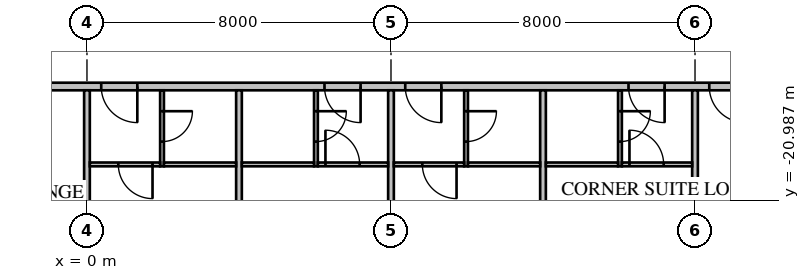
"""IFC4 building model, lengths in metres.
Left out: names, types, materials, properties, quantities, classifications, styles, units other than length and angle.
Written with IfcOpenShell. Run it as: python <this file> out.ifc"""

import sys

from ifc_helpers import new_model, si_unit, direction, frame, frame_2d, origin, place, context, subcontext, project, spatial, rectangle, extrude, element, fill, save


model = new_model("IFC4")
c1 = context("Model", 3, precision=1e-05, world=origin(), true_north=direction((0.0, 1.0)))
c2 = subcontext(c1, "Body", "Model", "MODEL_VIEW")
j1 = project(units=[si_unit("LENGTHUNIT", "METRE"), si_unit("PLANEANGLEUNIT", "RADIAN")], contexts=[c1])
p1 = place(None, origin())
s1 = spatial("IfcSite", under=j1, at=p1, CompositionType="ELEMENT")
p2 = place(p1, origin())
s2 = spatial("IfcBuilding", under=s1, at=p2, CompositionType="ELEMENT")
p3 = place(p2, frame((0.0, 0.0, 35.25)))
s3 = spatial("IfcBuildingStorey", under=s2, at=p3, CompositionType="ELEMENT", Elevation=35.25)
p4 = place(p3, frame((-18.0, -18.0, 0.0), z_axis=(0.0, 0.0, 1.0), x_axis=(1.0, 0.0, 0.0)))
e1 = element("IfcWall", 1, at=p4, inside=s3, PredefinedType="PARTITIONING", context=c2, shape_type="SweptSolid", body=[
    extrude(rectangle(XDim=36.0, YDim=0.2, at=frame_2d((18.0, 0.0))), origin(), (0.0, 0.0, 1.0), 3.65),
])
p5 = place(p4, frame((0.375, 0.0, 0.0)))
e2 = element("IfcOpeningElement", 2, at=p5, cuts=e1, PredefinedType="OPENING", context=c2, shape_type="SweptSolid", body=[
    extrude(rectangle(XDim=1.0, YDim=2.1, at=frame_2d((0.5, 1.05))), frame((0.0, 0.12, 0.0), z_axis=(0.0, -1.0, 0.0), x_axis=(1.0, 0.0, 0.0)), (0.0, 0.0, 1.0), 0.24),
])
p6 = place(p4, frame((2.45, 0.0, 0.0)))
e3 = element("IfcOpeningElement", 3, at=p6, cuts=e1, PredefinedType="OPENING", context=c2, shape_type="SweptSolid", body=[
    extrude(rectangle(XDim=0.8, YDim=2.1, at=frame_2d((0.4, 1.05))), frame((0.0, 0.12, 0.0), z_axis=(0.0, -1.0, 0.0), x_axis=(1.0, 0.0, 0.0)), (0.0, 0.0, 1.0), 0.24),
])
p7 = place(p4, frame((4.05, 0.0, 0.0)))
e4 = element("IfcOpeningElement", 4, at=p7, cuts=e1, PredefinedType="OPENING", context=c2, shape_type="SweptSolid", body=[
    extrude(rectangle(XDim=1.0, YDim=2.1, at=frame_2d((0.5, 1.05))), frame((0.0, 0.12, 0.0), z_axis=(0.0, -1.0, 0.0), x_axis=(1.0, 0.0, 0.0)), (0.0, 0.0, 1.0), 0.24),
])
p8 = place(p4, frame((6.45, 0.0, 0.0)))
e5 = element("IfcOpeningElement", 5, at=p8, cuts=e1, PredefinedType="OPENING", context=c2, shape_type="SweptSolid", body=[
    extrude(rectangle(XDim=0.9, YDim=2.1, at=frame_2d((0.45, 1.05))), frame((0.0, 0.12, 0.0), z_axis=(0.0, -1.0, 0.0), x_axis=(1.0, 0.0, 0.0)), (0.0, 0.0, 1.0), 0.24),
])
p9 = place(p4, frame((8.15, 0.0, 0.0)))
e6 = element("IfcOpeningElement", 6, at=p9, cuts=e1, PredefinedType="OPENING", context=c2, shape_type="SweptSolid", body=[
    extrude(rectangle(XDim=1.0, YDim=2.1, at=frame_2d((0.5, 1.05))), frame((0.0, 0.12, 0.0), z_axis=(0.0, -1.0, 0.0), x_axis=(1.0, 0.0, 0.0)), (0.0, 0.0, 1.0), 0.24),
])
p10 = place(p4, frame((18.375, 0.0, 0.0)))
e7 = element("IfcOpeningElement", 7, at=p10, cuts=e1, PredefinedType="OPENING", context=c2, shape_type="SweptSolid", body=[
    extrude(rectangle(XDim=0.95, YDim=2.1, at=frame_2d((0.475, 1.05))), frame((0.0, 0.12, 0.0), z_axis=(0.0, -1.0, 0.0), x_axis=(1.0, 0.0, 0.0)), (0.0, 0.0, 1.0), 0.24),
])
p11 = place(p4, frame((24.25, 0.0, 0.0)))
e8 = element("IfcOpeningElement", 8, at=p11, cuts=e1, PredefinedType="OPENING", context=c2, shape_type="SweptSolid", body=[
    extrude(rectangle(XDim=0.95, YDim=2.1, at=frame_2d((0.475, 1.05))), frame((0.0, 0.12, 0.0), z_axis=(0.0, -1.0, 0.0), x_axis=(1.0, 0.0, 0.0)), (0.0, 0.0, 1.0), 0.24),
])
p12 = place(p4, frame((26.375, 0.0, 0.0)))
e9 = element("IfcOpeningElement", 9, at=p12, cuts=e1, PredefinedType="OPENING", context=c2, shape_type="SweptSolid", body=[
    extrude(rectangle(XDim=0.95, YDim=2.1, at=frame_2d((0.475, 1.05))), frame((0.0, 0.12, 0.0), z_axis=(0.0, -1.0, 0.0), x_axis=(1.0, 0.0, 0.0)), (0.0, 0.0, 1.0), 0.24),
])
p13 = place(p4, frame((32.25, 0.0, 0.0)))
e10 = element("IfcOpeningElement", 10, at=p13, cuts=e1, PredefinedType="OPENING", context=c2, shape_type="SweptSolid", body=[
    extrude(rectangle(XDim=0.95, YDim=2.1, at=frame_2d((0.475, 1.05))), frame((0.0, 0.12, 0.0), z_axis=(0.0, -1.0, 0.0), x_axis=(1.0, 0.0, 0.0)), (0.0, 0.0, 1.0), 0.24),
])
p14 = place(p4, frame((34.375, 0.0, 0.0)))
e11 = element("IfcOpeningElement", 11, at=p14, cuts=e1, PredefinedType="OPENING", context=c2, shape_type="SweptSolid", body=[
    extrude(rectangle(XDim=0.95, YDim=2.1, at=frame_2d((0.475, 1.05))), frame((0.0, 0.12, 0.0), z_axis=(0.0, -1.0, 0.0), x_axis=(1.0, 0.0, 0.0)), (0.0, 0.0, 1.0), 0.24),
])
p15 = place(p4, frame((11.2, 0.0, 0.0)))
e12 = element("IfcOpeningElement", 12, at=p15, cuts=e1, PredefinedType="OPENING", context=c2, shape_type="SweptSolid", body=[
    extrude(rectangle(XDim=1.0, YDim=2.1, at=frame_2d((0.5, 1.05))), frame((0.0, 0.12, 0.0), z_axis=(0.0, -1.0, 0.0), x_axis=(1.0, 0.0, 0.0)), (0.0, 0.0, 1.0), 0.24),
])
p16 = place(p3, frame((0.0, -18.1, 0.0), z_axis=(0.0, 0.0, 1.0), x_axis=(0.0, -1.0, 0.0)))
e13 = element("IfcWall", 13, at=p16, inside=s3, PredefinedType="PARTITIONING", context=c2, shape_type="SweptSolid", body=[
    extrude(rectangle(XDim=6.6, YDim=0.15, at=frame_2d((3.3, 0.0))), origin(), (0.0, 0.0, 1.0), 2.809),
])
for number, where, z_axis, x_axis in (
    (14, (4.0, -18.1, 0.0), (0.0, 0.0, 1.0), (0.0, -1.0, 0.0)),
    (15, (8.0, -18.1, 0.0), (0.0, 0.0, 1.0), (0.0, -1.0, 0.0)),
    (16, (12.0, -18.1, 0.0), (0.0, 0.0, 1.0), (0.0, -1.0, 0.0)),
):
    element("IfcWall", number, at=place(p3, frame(where, z_axis=z_axis, x_axis=x_axis)), inside=s3, PredefinedType="PARTITIONING", context=c2, shape_type="SweptSolid", body=[
        extrude(rectangle(XDim=6.6, YDim=0.15, at=frame_2d((3.3, 0.0))), origin(), (0.0, 0.0, 1.0), 3.65),
    ])
p17 = place(p3, frame((16.0, -18.1, 0.0), z_axis=(0.0, 0.0, 1.0), x_axis=(0.0, -1.0, 0.0)))
e17 = element("IfcWall", 17, at=p17, inside=s3, PredefinedType="PARTITIONING", context=c2, shape_type="SweptSolid", body=[
    extrude(rectangle(XDim=6.589, YDim=0.15, at=frame_2d((3.295, 0.0))), origin(), (0.0, 0.0, 1.0), 3.65),
])
p18 = place(p3, frame((1.975, -18.1, 0.0), z_axis=(0.0, 0.0, 1.0), x_axis=(0.0, -1.0, 0.0)))
e18 = element("IfcWall", 18, at=p18, inside=s3, PredefinedType="PARTITIONING", context=c2, shape_type="SweptSolid", body=[
    extrude(rectangle(XDim=2.0, YDim=0.1, at=frame_2d((1.0, 0.0))), origin(), (0.0, 0.0, 1.0), 3.65),
])
p19 = place(p18, frame((0.55, 0.0, 0.0)))
e19 = element("IfcOpeningElement", 19, at=p19, cuts=e18, PredefinedType="OPENING", context=c2, shape_type="SweptSolid", body=[
    extrude(rectangle(XDim=0.8, YDim=2.1, at=frame_2d((0.4, 1.05))), frame((0.0, 0.07, 0.0), z_axis=(0.0, -1.0, 0.0), x_axis=(1.0, 0.0, 0.0)), (0.0, 0.0, 1.0), 0.14),
])
p20 = place(p3, frame((2.025, -20.05, 0.0), z_axis=(0.0, 0.0, 1.0), x_axis=(1.0, 0.0, 0.0)))
e20 = element("IfcWall", 20, at=p20, inside=s3, PredefinedType="PARTITIONING", context=c2, shape_type="SweptSolid", body=[
    extrude(rectangle(XDim=1.9, YDim=0.1, at=frame_2d((0.95, 0.0))), origin(), (0.0, 0.0, 1.0), 3.65),
])
p21 = place(p3, frame((6.025, -18.1, 0.0), z_axis=(0.0, 0.0, 1.0), x_axis=(0.0, -1.0, 0.0)))
e21 = element("IfcWall", 21, at=p21, inside=s3, PredefinedType="PARTITIONING", context=c2, shape_type="SweptSolid", body=[
    extrude(rectangle(XDim=2.0, YDim=0.1, at=frame_2d((1.0, 0.0))), origin(), (0.0, 0.0, 1.0), 3.65),
])
p22 = place(p21, frame((0.55, 0.0, 0.0)))
e22 = element("IfcOpeningElement", 22, at=p22, cuts=e21, PredefinedType="OPENING", context=c2, shape_type="SweptSolid", body=[
    extrude(rectangle(XDim=0.8, YDim=2.1, at=frame_2d((0.4, 1.05))), frame((0.0, 0.07, 0.0), z_axis=(0.0, -1.0, 0.0), x_axis=(1.0, 0.0, 0.0)), (0.0, 0.0, 1.0), 0.14),
])
p23 = place(p3, frame((4.075, -20.05, 0.0), z_axis=(0.0, 0.0, 1.0), x_axis=(1.0, 0.0, 0.0)))
e23 = element("IfcWall", 23, at=p23, inside=s3, PredefinedType="PARTITIONING", context=c2, shape_type="SweptSolid", body=[
    extrude(rectangle(XDim=1.9, YDim=0.1, at=frame_2d((0.95, 0.0))), origin(), (0.0, 0.0, 1.0), 3.65),
])
p24 = place(p3, frame((9.975, -18.1, 0.0), z_axis=(0.0, 0.0, 1.0), x_axis=(0.0, -1.0, 0.0)))
e24 = element("IfcWall", 24, at=p24, inside=s3, PredefinedType="PARTITIONING", context=c2, shape_type="SweptSolid", body=[
    extrude(rectangle(XDim=2.0, YDim=0.1, at=frame_2d((1.0, 0.0))), origin(), (0.0, 0.0, 1.0), 3.65),
])
p25 = place(p24, frame((0.55, 0.0, 0.0)))
e25 = element("IfcOpeningElement", 25, at=p25, cuts=e24, PredefinedType="OPENING", context=c2, shape_type="SweptSolid", body=[
    extrude(rectangle(XDim=0.8, YDim=2.1, at=frame_2d((0.4, 1.05))), frame((0.0, 0.07, 0.0), z_axis=(0.0, -1.0, 0.0), x_axis=(1.0, 0.0, 0.0)), (0.0, 0.0, 1.0), 0.14),
])
p26 = place(p3, frame((10.025, -20.05, 0.0), z_axis=(0.0, 0.0, 1.0), x_axis=(1.0, 0.0, 0.0)))
e26 = element("IfcWall", 26, at=p26, inside=s3, PredefinedType="PARTITIONING", context=c2, shape_type="SweptSolid", body=[
    extrude(rectangle(XDim=1.9, YDim=0.1, at=frame_2d((0.95, 0.0))), origin(), (0.0, 0.0, 1.0), 3.65),
])
p27 = place(p3, frame((14.025, -18.1, 0.0), z_axis=(0.0, 0.0, 1.0), x_axis=(0.0, -1.0, 0.0)))
e27 = element("IfcWall", 27, at=p27, inside=s3, PredefinedType="PARTITIONING", context=c2, shape_type="SweptSolid", body=[
    extrude(rectangle(XDim=2.0, YDim=0.1, at=frame_2d((1.0, 0.0))), origin(), (0.0, 0.0, 1.0), 3.65),
])
p28 = place(p27, frame((0.55, 0.0, 0.0)))
e28 = element("IfcOpeningElement", 28, at=p28, cuts=e27, PredefinedType="OPENING", context=c2, shape_type="SweptSolid", body=[
    extrude(rectangle(XDim=0.8, YDim=2.1, at=frame_2d((0.4, 1.05))), frame((0.0, 0.07, 0.0), z_axis=(0.0, -1.0, 0.0), x_axis=(1.0, 0.0, 0.0)), (0.0, 0.0, 1.0), 0.14),
])
p29 = place(p3, frame((12.075, -20.05, 0.0), z_axis=(0.0, 0.0, 1.0), x_axis=(1.0, 0.0, 0.0)))
e29 = element("IfcWall", 29, at=p29, inside=s3, PredefinedType="PARTITIONING", context=c2, shape_type="SweptSolid", body=[
    extrude(rectangle(XDim=1.9, YDim=0.1, at=frame_2d((0.95, 0.0))), origin(), (0.0, 0.0, 1.0), 3.65),
])
p30 = place(p3, frame((0.075, -20.05, 0.0), z_axis=(0.0, 0.0, 1.0), x_axis=(1.0, 0.0, 0.0)))
e30 = element("IfcWall", 30, at=p30, inside=s3, PredefinedType="PARTITIONING", context=c2, shape_type="SweptSolid", body=[
    extrude(rectangle(XDim=1.85, YDim=0.1, at=frame_2d((0.925, 0.0))), origin(), (0.0, 0.0, 1.0), 3.65),
])
p31 = place(p30, frame((0.75, 0.0, 0.0)))
e31 = element("IfcOpeningElement", 31, at=p31, cuts=e30, PredefinedType="OPENING", context=c2, shape_type="SweptSolid", body=[
    extrude(rectangle(XDim=0.9, YDim=2.1, at=frame_2d((0.45, 1.05))), frame((0.0, 0.07, 0.0), z_axis=(0.0, -1.0, 0.0), x_axis=(1.0, 0.0, 0.0)), (0.0, 0.0, 1.0), 0.14),
])
p32 = place(p3, frame((6.075, -20.05, 0.0), z_axis=(0.0, 0.0, 1.0), x_axis=(1.0, 0.0, 0.0)))
e32 = element("IfcWall", 32, at=p32, inside=s3, PredefinedType="PARTITIONING", context=c2, shape_type="SweptSolid", body=[
    extrude(rectangle(XDim=1.85, YDim=0.1, at=frame_2d((0.925, 0.0))), origin(), (0.0, 0.0, 1.0), 3.65),
])
p33 = place(p32, frame((0.2, 0.0, 0.0)))
e33 = element("IfcOpeningElement", 33, at=p33, cuts=e32, PredefinedType="OPENING", context=c2, shape_type="SweptSolid", body=[
    extrude(rectangle(XDim=0.9, YDim=2.1, at=frame_2d((0.45, 1.05))), frame((0.0, 0.07, 0.0), z_axis=(0.0, -1.0, 0.0), x_axis=(1.0, 0.0, 0.0)), (0.0, 0.0, 1.0), 0.14),
])
p34 = place(p3, frame((8.075, -20.05, 0.0), z_axis=(0.0, 0.0, 1.0), x_axis=(1.0, 0.0, 0.0)))
e34 = element("IfcWall", 34, at=p34, inside=s3, PredefinedType="PARTITIONING", context=c2, shape_type="SweptSolid", body=[
    extrude(rectangle(XDim=1.85, YDim=0.1, at=frame_2d((0.925, 0.0))), origin(), (0.0, 0.0, 1.0), 3.65),
])
p35 = place(p34, frame((0.75, 0.0, 0.0)))
e35 = element("IfcOpeningElement", 35, at=p35, cuts=e34, PredefinedType="OPENING", context=c2, shape_type="SweptSolid", body=[
    extrude(rectangle(XDim=0.9, YDim=2.1, at=frame_2d((0.45, 1.05))), frame((0.0, 0.07, 0.0), z_axis=(0.0, -1.0, 0.0), x_axis=(1.0, 0.0, 0.0)), (0.0, 0.0, 1.0), 0.14),
])
p36 = place(p3, frame((14.075, -20.05, 0.0), z_axis=(0.0, 0.0, 1.0), x_axis=(1.0, 0.0, 0.0)))
e36 = element("IfcWall", 36, at=p36, inside=s3, PredefinedType="PARTITIONING", context=c2, shape_type="SweptSolid", body=[
    extrude(rectangle(XDim=1.85, YDim=0.1, at=frame_2d((0.925, 0.0))), origin(), (0.0, 0.0, 1.0), 3.65),
])
p37 = place(p36, frame((0.2, 0.0, 0.0)))
e37 = element("IfcOpeningElement", 37, at=p37, cuts=e36, PredefinedType="OPENING", context=c2, shape_type="SweptSolid", body=[
    extrude(rectangle(XDim=0.9, YDim=2.1, at=frame_2d((0.45, 1.05))), frame((0.0, 0.07, 0.0), z_axis=(0.0, -1.0, 0.0), x_axis=(1.0, 0.0, 0.0)), (0.0, 0.0, 1.0), 0.14),
])
p38 = place(p10, origin())
e38 = element("IfcDoor", 38, at=p38, inside=s3, OperationType="SINGLE_SWING_RIGHT", PredefinedType="DOOR", context=c2, shape_type="SweptSolid", body=[
    extrude(rectangle(XDim=0.95, YDim=2.1, at=frame_2d((0.475, 1.05))), frame((0.0, 0.025, 0.0), z_axis=(0.0, -1.0, 0.0), x_axis=(1.0, 0.0, 0.0)), (0.0, 0.0, 1.0), 0.05),
])
fill(e7, e38)
p39 = place(p19, origin())
e39 = element("IfcDoor", 39, at=p39, inside=s3, OperationType="SINGLE_SWING_LEFT", PredefinedType="DOOR", context=c2, shape_type="SweptSolid", body=[
    extrude(rectangle(XDim=0.8, YDim=2.1, at=frame_2d((0.4, 1.05))), frame((0.0, 0.025, 0.0), z_axis=(0.0, -1.0, 0.0), x_axis=(1.0, 0.0, 0.0)), (0.0, 0.0, 1.0), 0.05),
])
fill(e19, e39)
p40 = place(p11, origin())
e40 = element("IfcDoor", 40, at=p40, inside=s3, OperationType="SINGLE_SWING_RIGHT", PredefinedType="DOOR", context=c2, shape_type="SweptSolid", body=[
    extrude(rectangle(XDim=0.95, YDim=2.1, at=frame_2d((0.475, 1.05))), frame((0.0, 0.025, 0.0), z_axis=(0.0, -1.0, 0.0), x_axis=(1.0, 0.0, 0.0)), (0.0, 0.0, 1.0), 0.05),
])
fill(e8, e40)
p41 = place(p22, origin())
e41 = element("IfcDoor", 41, at=p41, inside=s3, OperationType="SINGLE_SWING_LEFT", PredefinedType="DOOR", context=c2, shape_type="SweptSolid", body=[
    extrude(rectangle(XDim=0.8, YDim=2.1, at=frame_2d((0.4, 1.05))), frame((0.0, 0.025, 0.0), z_axis=(0.0, -1.0, 0.0), x_axis=(1.0, 0.0, 0.0)), (0.0, 0.0, 1.0), 0.05),
])
fill(e22, e41)
p42 = place(p12, origin())
e42 = element("IfcDoor", 42, at=p42, inside=s3, OperationType="SINGLE_SWING_RIGHT", PredefinedType="DOOR", context=c2, shape_type="SweptSolid", body=[
    extrude(rectangle(XDim=0.95, YDim=2.1, at=frame_2d((0.475, 1.05))), frame((0.0, 0.025, 0.0), z_axis=(0.0, -1.0, 0.0), x_axis=(1.0, 0.0, 0.0)), (0.0, 0.0, 1.0), 0.05),
])
fill(e9, e42)
p43 = place(p25, origin())
e43 = element("IfcDoor", 43, at=p43, inside=s3, OperationType="SINGLE_SWING_LEFT", PredefinedType="DOOR", context=c2, shape_type="SweptSolid", body=[
    extrude(rectangle(XDim=0.8, YDim=2.1, at=frame_2d((0.4, 1.05))), frame((0.0, 0.025, 0.0), z_axis=(0.0, -1.0, 0.0), x_axis=(1.0, 0.0, 0.0)), (0.0, 0.0, 1.0), 0.05),
])
fill(e25, e43)
p44 = place(p13, origin())
e44 = element("IfcDoor", 44, at=p44, inside=s3, OperationType="SINGLE_SWING_RIGHT", PredefinedType="DOOR", context=c2, shape_type="SweptSolid", body=[
    extrude(rectangle(XDim=0.95, YDim=2.1, at=frame_2d((0.475, 1.05))), frame((0.0, 0.025, 0.0), z_axis=(0.0, -1.0, 0.0), x_axis=(1.0, 0.0, 0.0)), (0.0, 0.0, 1.0), 0.05),
])
fill(e10, e44)
p45 = place(p28, origin())
e45 = element("IfcDoor", 45, at=p45, inside=s3, OperationType="SINGLE_SWING_LEFT", PredefinedType="DOOR", context=c2, shape_type="SweptSolid", body=[
    extrude(rectangle(XDim=0.8, YDim=2.1, at=frame_2d((0.4, 1.05))), frame((0.0, 0.025, 0.0), z_axis=(0.0, -1.0, 0.0), x_axis=(1.0, 0.0, 0.0)), (0.0, 0.0, 1.0), 0.05),
])
fill(e28, e45)
p46 = place(p14, origin())
e46 = element("IfcDoor", 46, at=p46, inside=s3, OperationType="SINGLE_SWING_RIGHT", PredefinedType="DOOR", context=c2, shape_type="SweptSolid", body=[
    extrude(rectangle(XDim=0.95, YDim=2.1, at=frame_2d((0.475, 1.05))), frame((0.0, 0.025, 0.0), z_axis=(0.0, -1.0, 0.0), x_axis=(1.0, 0.0, 0.0)), (0.0, 0.0, 1.0), 0.05),
])
fill(e11, e46)
p47 = place(p31, origin())
e47 = element("IfcDoor", 47, at=p47, inside=s3, OperationType="SINGLE_SWING_RIGHT", PredefinedType="DOOR", context=c2, shape_type="SweptSolid", body=[
    extrude(rectangle(XDim=0.9, YDim=2.1, at=frame_2d((0.45, 1.05))), frame((0.0, 0.025, 0.0), z_axis=(0.0, -1.0, 0.0), x_axis=(1.0, 0.0, 0.0)), (0.0, 0.0, 1.0), 0.05),
])
fill(e31, e47)
p48 = place(p33, origin())
e48 = element("IfcDoor", 48, at=p48, inside=s3, OperationType="SINGLE_SWING_LEFT", PredefinedType="DOOR", context=c2, shape_type="SweptSolid", body=[
    extrude(rectangle(XDim=0.9, YDim=2.1, at=frame_2d((0.45, 1.05))), frame((0.0, 0.025, 0.0), z_axis=(0.0, -1.0, 0.0), x_axis=(1.0, 0.0, 0.0)), (0.0, 0.0, 1.0), 0.05),
])
fill(e33, e48)
p49 = place(p35, origin())
e49 = element("IfcDoor", 49, at=p49, inside=s3, OperationType="SINGLE_SWING_RIGHT", PredefinedType="DOOR", context=c2, shape_type="SweptSolid", body=[
    extrude(rectangle(XDim=0.9, YDim=2.1, at=frame_2d((0.45, 1.05))), frame((0.0, 0.025, 0.0), z_axis=(0.0, -1.0, 0.0), x_axis=(1.0, 0.0, 0.0)), (0.0, 0.0, 1.0), 0.05),
])
fill(e35, e49)
p50 = place(p37, origin())
e50 = element("IfcDoor", 50, at=p50, inside=s3, OperationType="SINGLE_SWING_LEFT", PredefinedType="DOOR", context=c2, shape_type="SweptSolid", body=[
    extrude(rectangle(XDim=0.9, YDim=2.1, at=frame_2d((0.45, 1.05))), frame((0.0, 0.025, 0.0), z_axis=(0.0, -1.0, 0.0), x_axis=(1.0, 0.0, 0.0)), (0.0, 0.0, 1.0), 0.05),
])
fill(e37, e50)
save(model, sys.argv[1])
